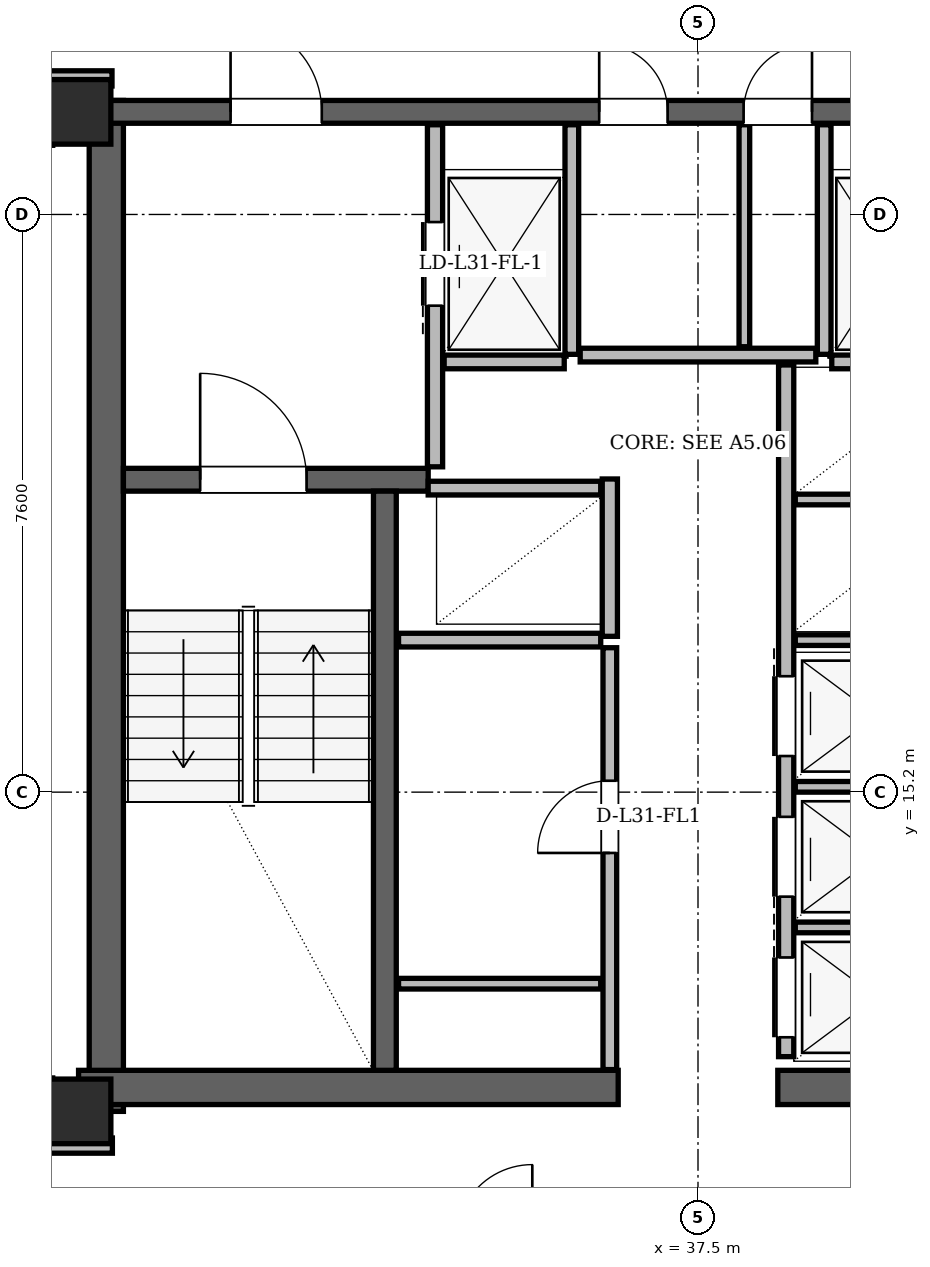
"""IFC4 building model, lengths in metres.
Left out: names, types, materials, properties, quantities, classifications, styles, units other than length and angle.
Written with IfcOpenShell. Run it as: python <this file> out.ifc"""

import sys

from ifc_helpers import new_model, si_unit, direction, frame, frame_2d, origin, origin_2d, place, context, subcontext, project, spatial, rectangle, hollow_rectangle, extrude, element, fill, save


model = new_model("IFC4")
c1 = context("Model", 3, precision=1e-05, world=origin(), true_north=direction((0.0, 1.0)))
c2 = subcontext(c1, "Body", "Model", "MODEL_VIEW")
j1 = project(units=[si_unit("LENGTHUNIT", "METRE"), si_unit("PLANEANGLEUNIT", "RADIAN")], contexts=[c1])
p1 = place(None, origin())
s1 = spatial("IfcSite", under=j1, at=p1, CompositionType="ELEMENT")
p2 = place(p1, origin())
s2 = spatial("IfcBuilding", under=s1, at=p2, CompositionType="ELEMENT")
p3 = place(p2, frame((0.0, 0.0, 119.4)))
s3 = spatial("IfcBuildingStorey", under=s2, at=p3, CompositionType="ELEMENT", Elevation=119.4)
for number, where, z_axis, x_axis in (
    (1, (29.35, 11.0, 0.0), (0.0, 0.0, 1.0), (1.0, 0.0, 0.0)),
    (2, (29.35, 24.15, 0.0), (0.0, 0.0, 1.0), (1.0, 0.0, 0.0)),
):
    element("IfcColumn", number, at=place(p3, frame(where, z_axis=z_axis, x_axis=x_axis)), inside=s3, PredefinedType="COLUMN", context=c2, shape_type="SweptSolid", body=[
        extrude(hollow_rectangle(XDim=0.85, YDim=0.85, WallThickness=0.07, at=origin_2d()), origin(), (0.0, 0.0, 1.0), 3.6),
    ])
p4 = place(p3, frame((29.715, 11.0, 0.0), z_axis=(0.0, 0.0, 1.0), x_axis=(0.0, 1.0, 0.0)))
e3 = element("IfcWall", 3, at=p4, inside=s3, PredefinedType="SHEAR", context=c2, shape_type="SweptSolid", body=[
    extrude(rectangle(XDim=13.3, YDim=0.45, at=frame_2d((6.65, 0.0))), origin(), (0.0, 0.0, 1.0), 3.36),
])
for number, where, z_axis, x_axis in (
    (4, (29.35, 11.315, 0.0), (0.0, 0.0, 1.0), (1.0, 0.0, 0.0)),
    (5, (38.55, 11.315, 0.0), (0.0, 0.0, 1.0), (1.0, 0.0, 0.0)),
):
    element("IfcWall", number, at=place(p3, frame(where, z_axis=z_axis, x_axis=x_axis)), inside=s3, PredefinedType="SHEAR", context=c2, shape_type="SweptSolid", body=[
        extrude(rectangle(XDim=7.1, YDim=0.45, at=frame_2d((3.55, 0.0))), origin(), (0.0, 0.0, 1.0), 3.36),
    ])
p5 = place(p3, frame((29.65, 24.15, 0.0), z_axis=(0.0, 0.0, 1.0), x_axis=(1.0, 0.0, 0.0)))
e6 = element("IfcWall", 6, at=p5, inside=s3, PredefinedType="SHEAR", context=c2, shape_type="SweptSolid", body=[
    extrude(rectangle(XDim=15.7, YDim=0.3, at=frame_2d((7.85, 0.0))), origin(), (0.0, 0.0, 1.0), 3.36),
])
p6 = place(p5, frame((1.7, 0.0, 0.0)))
e7 = element("IfcOpeningElement", 7, at=p6, cuts=e6, PredefinedType="OPENING", context=c2, shape_type="SweptSolid", body=[
    extrude(rectangle(XDim=1.2, YDim=2.2, at=frame_2d((0.6, 1.1))), frame((0.0, 0.15, 0.0), z_axis=(0.0, -1.0, 0.0), x_axis=(1.0, 0.0, 0.0)), (0.0, 0.0, 1.0), 0.3),
])
p7 = place(p5, frame((12.8, 0.0, 0.0)))
e8 = element("IfcOpeningElement", 8, at=p7, cuts=e6, PredefinedType="OPENING", context=c2, shape_type="SweptSolid", body=[
    extrude(rectangle(XDim=1.2, YDim=2.2, at=frame_2d((0.6, 1.1))), frame((0.0, 0.15, 0.0), z_axis=(0.0, -1.0, 0.0), x_axis=(1.0, 0.0, 0.0)), (0.0, 0.0, 1.0), 0.3),
])
p8 = place(p5, frame((6.55, 0.0, 0.0)))
e9 = element("IfcOpeningElement", 9, at=p8, cuts=e6, PredefinedType="OPENING", context=c2, shape_type="SweptSolid", body=[
    extrude(rectangle(XDim=0.9, YDim=2.05, at=frame_2d((0.45, 1.025))), frame((0.0, 0.15, 0.0), z_axis=(0.0, -1.0, 0.0), x_axis=(1.0, 0.0, 0.0)), (0.0, 0.0, 1.0), 0.3),
])
p9 = place(p5, frame((8.45, 0.0, 0.0)))
e10 = element("IfcOpeningElement", 10, at=p9, cuts=e6, PredefinedType="OPENING", context=c2, shape_type="SweptSolid", body=[
    extrude(rectangle(XDim=0.9, YDim=2.05, at=frame_2d((0.45, 1.025))), frame((0.0, 0.15, 0.0), z_axis=(0.0, -1.0, 0.0), x_axis=(1.0, 0.0, 0.0)), (0.0, 0.0, 1.0), 0.3),
])
p10 = place(p3, frame((29.94, 19.31, 0.0), z_axis=(0.0, 0.0, 1.0), x_axis=(1.0, 0.0, 0.0)))
e11 = element("IfcWall", 11, at=p10, inside=s3, PredefinedType="SHEAR", context=c2, shape_type="SweptSolid", body=[
    extrude(rectangle(XDim=4.01, YDim=0.3, at=frame_2d((2.005, 0.0))), origin(), (0.0, 0.0, 1.0), 3.36),
])
p11 = place(p10, frame((1.01, 0.0, 0.0)))
e12 = element("IfcOpeningElement", 12, at=p11, cuts=e11, PredefinedType="OPENING", context=c2, shape_type="SweptSolid", body=[
    extrude(rectangle(XDim=1.4, YDim=2.2, at=frame_2d((0.7, 1.1))), frame((0.0, 0.15, 0.0), z_axis=(0.0, -1.0, 0.0), x_axis=(1.0, 0.0, 0.0)), (0.0, 0.0, 1.0), 0.3),
])
p12 = place(p3, frame((33.38, 11.54, 0.0), z_axis=(0.0, 0.0, 1.0), x_axis=(0.0, 1.0, 0.0)))
e13 = element("IfcWall", 13, at=p12, inside=s3, PredefinedType="SHEAR", context=c2, shape_type="SweptSolid", body=[
    extrude(rectangle(XDim=7.62, YDim=0.3, at=frame_2d((3.81, 0.0))), origin(), (0.0, 0.0, 1.0), 3.36),
])
p13 = place(p3, frame((32.034, 43.406, 0.0), z_axis=(0.0, 0.0, 1.0), x_axis=(-0.499998569178, -0.866026229868, 0.0)))
e14 = element("IfcWall", 14, at=p13, inside=s3, PredefinedType="SOLIDWALL", context=c2, shape_type="SweptSolid", body=[
    extrude(rectangle(XDim=34.901, YDim=0.34, at=frame_2d((17.451, 0.0))), origin(), (0.0, 0.0, 1.0), 2.578),
])
p14 = place(p13, frame((6.469, 0.0, 0.0)))
e15 = element("IfcOpeningElement", 15, at=p14, cuts=e14, PredefinedType="OPENING", context=c2, shape_type="SweptSolid", body=[
    extrude(rectangle(XDim=1.3, YDim=2.2, at=frame_2d((0.65, 1.1))), frame((0.0, 0.17, 0.0), z_axis=(0.0, -1.0, 0.0), x_axis=(1.0, 0.0, 0.0)), (0.0, 0.0, 1.0), 0.34),
])
p15 = place(p13, frame((25.997, 0.0, 0.0)))
e16 = element("IfcOpeningElement", 16, at=p15, cuts=e14, PredefinedType="OPENING", context=c2, shape_type="SweptSolid", body=[
    extrude(rectangle(XDim=1.5, YDim=2.2, at=frame_2d((0.75, 1.1))), frame((0.0, 0.17, 0.0), z_axis=(0.0, -1.0, 0.0), x_axis=(1.0, 0.0, 0.0)), (0.0, 0.0, 1.0), 0.34),
])
p16 = place(p13, frame((12.195, 0.0, 0.85)))
e17 = element("IfcOpeningElement", 17, at=p16, cuts=e14, PredefinedType="OPENING", context=c2, shape_type="SweptSolid", body=[
    extrude(rectangle(XDim=1.8, YDim=1.618, at=frame_2d((0.9, 0.809))), frame((0.0, 0.17, 0.0), z_axis=(0.0, -1.0, 0.0), x_axis=(1.0, 0.0, 0.0)), (0.0, 0.0, 1.0), 0.34),
])
p17 = place(p13, frame((18.557, 0.0, 0.85)))
e18 = element("IfcOpeningElement", 18, at=p17, cuts=e14, PredefinedType="OPENING", context=c2, shape_type="SweptSolid", body=[
    extrude(rectangle(XDim=1.2, YDim=1.48, at=frame_2d((0.6, 0.74))), frame((0.0, 0.17, 0.0), z_axis=(0.0, -1.0, 0.0), x_axis=(1.0, 0.0, 0.0)), (0.0, 0.0, 1.0), 0.34),
])
p18 = place(p13, frame((3.108, 0.0, 0.85)))
e19 = element("IfcOpeningElement", 19, at=p18, cuts=e14, PredefinedType="OPENING", context=c2, shape_type="SweptSolid", body=[
    extrude(rectangle(XDim=1.2, YDim=1.48, at=frame_2d((0.6, 0.74))), frame((0.0, 0.17, 0.0), z_axis=(0.0, -1.0, 0.0), x_axis=(1.0, 0.0, 0.0)), (0.0, 0.0, 1.0), 0.34),
])
p19 = place(p13, frame((30.626, 0.0, 0.85)))
e20 = element("IfcOpeningElement", 20, at=p19, cuts=e14, PredefinedType="OPENING", context=c2, shape_type="SweptSolid", body=[
    extrude(rectangle(XDim=1.2, YDim=1.48, at=frame_2d((0.6, 0.74))), frame((0.0, 0.17, 0.0), z_axis=(0.0, -1.0, 0.0), x_axis=(1.0, 0.0, 0.0)), (0.0, 0.0, 1.0), 0.34),
])
p20 = place(p3, frame((34.04, 19.48, 0.0), z_axis=(0.0, 0.0, 1.0), x_axis=(0.0, 1.0, 0.0)))
e21 = element("IfcWall", 21, at=p20, inside=s3, PredefinedType="PARTITIONING", context=c2, shape_type="SweptSolid", body=[
    extrude(rectangle(XDim=4.5, YDim=0.2, at=frame_2d((2.25, 0.0))), origin(), (0.0, 0.0, 1.0), 2.4),
])
p21 = place(p20, frame((2.12, 0.0, 0.0)))
e22 = element("IfcOpeningElement", 22, at=p21, cuts=e21, PredefinedType="OPENING", context=c2, shape_type="SweptSolid", body=[
    extrude(rectangle(XDim=1.1, YDim=2.2, at=frame_2d((0.55, 1.1))), frame((0.0, 0.1, 0.0), z_axis=(0.0, -1.0, 0.0), x_axis=(1.0, 0.0, 0.0)), (0.0, 0.0, 1.0), 0.2),
])
p22 = place(p3, frame((35.84, 20.96, 0.0), z_axis=(0.0, 0.0, 1.0), x_axis=(0.0, 1.0, 0.0)))
e23 = element("IfcWall", 23, at=p22, inside=s3, PredefinedType="PARTITIONING", context=c2, shape_type="SweptSolid", body=[
    extrude(rectangle(XDim=3.02, YDim=0.18, at=frame_2d((1.51, 0.0))), origin(), (0.0, 0.0, 1.0), 2.4),
])
p23 = place(p3, frame((34.16, 20.86, 0.0), z_axis=(0.0, 0.0, 1.0), x_axis=(1.0, 0.0, 0.0)))
e24 = element("IfcWall", 24, at=p23, inside=s3, PredefinedType="PARTITIONING", context=c2, shape_type="SweptSolid", body=[
    extrude(rectangle(XDim=1.58, YDim=0.18, at=frame_2d((0.79, 0.0))), origin(), (0.0, 0.0, 1.0), 3.36),
])
p24 = place(p3, frame((39.16, 20.96, 0.0), z_axis=(0.0, 0.0, 1.0), x_axis=(0.0, 1.0, 0.0)))
e25 = element("IfcWall", 25, at=p24, inside=s3, PredefinedType="PARTITIONING", context=c2, shape_type="SweptSolid", body=[
    extrude(rectangle(XDim=3.02, YDim=0.18, at=frame_2d((1.51, 0.0))), origin(), (0.0, 0.0, 1.0), 2.4),
])
p25 = place(p3, frame((39.26, 20.86, 0.0), z_axis=(0.0, 0.0, 1.0), x_axis=(1.0, 0.0, 0.0)))
e26 = element("IfcWall", 26, at=p25, inside=s3, PredefinedType="PARTITIONING", context=c2, shape_type="SweptSolid", body=[
    extrude(rectangle(XDim=1.58, YDim=0.18, at=frame_2d((0.79, 0.0))), origin(), (0.0, 0.0, 1.0), 3.36),
])
p26 = place(p3, frame((36.34, 17.25, 0.0), z_axis=(0.0, 0.0, 1.0), x_axis=(0.0, 1.0, 0.0)))
e27 = element("IfcWall", 27, at=p26, inside=s3, PredefinedType="PARTITIONING", context=c2, shape_type="SweptSolid", body=[
    extrude(rectangle(XDim=2.07, YDim=0.2, at=frame_2d((1.035, 0.0))), origin(), (0.0, 0.0, 1.0), 3.36),
])
p27 = place(p3, frame((33.95, 19.2, 0.0), z_axis=(0.0, 0.0, 1.0), x_axis=(1.0, 0.0, 0.0)))
e28 = element("IfcWall", 28, at=p27, inside=s3, PredefinedType="PARTITIONING", context=c2, shape_type="SweptSolid", body=[
    extrude(rectangle(XDim=2.27, YDim=0.18, at=frame_2d((1.135, 0.0))), origin(), (0.0, 0.0, 1.0), 3.36),
])
p28 = place(p3, frame((33.56, 17.2, 0.0), z_axis=(0.0, 0.0, 1.0), x_axis=(1.0, 0.0, 0.0)))
e29 = element("IfcWall", 29, at=p28, inside=s3, PredefinedType="PARTITIONING", context=c2, shape_type="SweptSolid", body=[
    extrude(rectangle(XDim=2.66, YDim=0.18, at=frame_2d((1.33, 0.0))), origin(), (0.0, 0.0, 1.0), 3.36),
])
p29 = place(p3, frame((36.34, 11.55, 0.0), z_axis=(0.0, 0.0, 1.0), x_axis=(0.0, 1.0, 0.0)))
e30 = element("IfcWall", 30, at=p29, inside=s3, PredefinedType="PARTITIONING", context=c2, shape_type="SweptSolid", body=[
    extrude(rectangle(XDim=5.55, YDim=0.18, at=frame_2d((2.775, 0.0))), origin(), (0.0, 0.0, 1.0), 3.36),
])
p30 = place(p29, frame((2.85, 0.0, 0.0)))
e31 = element("IfcOpeningElement", 31, at=p30, cuts=e30, PredefinedType="OPENING", context=c2, shape_type="SweptSolid", body=[
    extrude(rectangle(XDim=0.95, YDim=2.1, at=frame_2d((0.475, 1.05))), frame((0.0, 0.09, 0.0), z_axis=(0.0, -1.0, 0.0), x_axis=(1.0, 0.0, 0.0)), (0.0, 0.0, 1.0), 0.18),
])
p31 = place(p3, frame((33.56, 12.68, 0.0), z_axis=(0.0, 0.0, 1.0), x_axis=(1.0, 0.0, 0.0)))
e32 = element("IfcWall", 32, at=p31, inside=s3, PredefinedType="PARTITIONING", context=c2, shape_type="SweptSolid", body=[
    extrude(rectangle(XDim=2.66, YDim=0.14, at=frame_2d((1.33, 0.0))), origin(), (0.0, 0.0, 1.0), 3.36),
])
p32 = place(p3, frame((38.66, 11.72, 0.0), z_axis=(0.0, 0.0, 1.0), x_axis=(0.0, 1.0, 0.0)))
e33 = element("IfcWall", 33, at=p32, inside=s3, PredefinedType="PARTITIONING", context=c2, shape_type="SweptSolid", body=[
    extrude(rectangle(XDim=9.1, YDim=0.2, at=frame_2d((4.55, 0.0))), origin(), (0.0, 0.0, 1.0), 3.36),
])
p33 = place(p32, frame((0.255, 0.0, 0.0)))
e34 = element("IfcOpeningElement", 34, at=p33, cuts=e33, PredefinedType="OPENING", context=c2, shape_type="SweptSolid", body=[
    extrude(rectangle(XDim=1.05, YDim=2.15, at=frame_2d((0.525, 1.075))), frame((0.0, 0.1, 0.0), z_axis=(0.0, -1.0, 0.0), x_axis=(1.0, 0.0, 0.0)), (0.0, 0.0, 1.0), 0.2),
])
p34 = place(p32, frame((2.105, 0.0, 0.0)))
e35 = element("IfcOpeningElement", 35, at=p34, cuts=e33, PredefinedType="OPENING", context=c2, shape_type="SweptSolid", body=[
    extrude(rectangle(XDim=1.05, YDim=2.15, at=frame_2d((0.525, 1.075))), frame((0.0, 0.1, 0.0), z_axis=(0.0, -1.0, 0.0), x_axis=(1.0, 0.0, 0.0)), (0.0, 0.0, 1.0), 0.2),
])
p35 = place(p32, frame((3.955, 0.0, 0.0)))
e36 = element("IfcOpeningElement", 36, at=p35, cuts=e33, PredefinedType="OPENING", context=c2, shape_type="SweptSolid", body=[
    extrude(rectangle(XDim=1.05, YDim=2.15, at=frame_2d((0.525, 1.075))), frame((0.0, 0.1, 0.0), z_axis=(0.0, -1.0, 0.0), x_axis=(1.0, 0.0, 0.0)), (0.0, 0.0, 1.0), 0.2),
])
for number, where, z_axis, x_axis in (
    (37, (38.78, 13.42, 0.0), (0.0, 0.0, 1.0), (1.0, 0.0, 0.0)),
    (38, (38.78, 15.27, 0.0), (0.0, 0.0, 1.0), (1.0, 0.0, 0.0)),
    (39, (38.78, 17.2, 0.0), (0.0, 0.0, 1.0), (1.0, 0.0, 0.0)),
    (40, (38.78, 19.05, 0.0), (0.0, 0.0, 1.0), (1.0, 0.0, 0.0)),
):
    element("IfcWall", number, at=place(p3, frame(where, z_axis=z_axis, x_axis=x_axis)), inside=s3, PredefinedType="PARTITIONING", context=c2, shape_type="SweptSolid", body=[
        extrude(rectangle(XDim=2.66, YDim=0.14, at=frame_2d((1.33, 0.0))), origin(), (0.0, 0.0, 1.0), 3.36),
    ])
p36 = place(p3, frame((35.95, 20.95, 0.0), z_axis=(0.0, 0.0, 1.0), x_axis=(1.0, 0.0, 0.0)))
e41 = element("IfcWall", 41, at=p36, inside=s3, PredefinedType="PARTITIONING", context=c2, shape_type="SweptSolid", body=[
    extrude(rectangle(XDim=3.1, YDim=0.18, at=frame_2d((1.55, 0.0))), origin(), (0.0, 0.0, 1.0), 3.36),
])
p37 = place(p3, frame((38.11, 21.06, 0.0), z_axis=(0.0, 0.0, 1.0), x_axis=(0.0, 1.0, 0.0)))
e42 = element("IfcWall", 42, at=p37, inside=s3, PredefinedType="PARTITIONING", context=c2, shape_type="SweptSolid", body=[
    extrude(rectangle(XDim=2.92, YDim=0.14, at=frame_2d((1.46, 0.0))), origin(), (0.0, 0.0, 1.0), 2.4),
])
p38 = place(p3, frame((28.905, 10.55, 0.0), z_axis=(0.0, 0.0, 1.0), x_axis=(1.0, 0.0, 0.0)))
e43 = element("IfcWall", 43, at=p38, inside=s3, PredefinedType="PARTITIONING", context=c2, shape_type="SweptSolid", body=[
    extrude(rectangle(XDim=0.89, YDim=0.2, at=frame_2d((0.445, 0.0))), origin(), (0.0, 0.0, 1.0), 3.36),
])
p39 = place(p3, frame((28.91, 24.59, 0.0), z_axis=(0.0, 0.0, 1.0), x_axis=(1.0, 0.0, 0.0)))
e44 = element("IfcWall", 44, at=p39, inside=s3, PredefinedType="PARTITIONING", context=c2, shape_type="SweptSolid", body=[
    extrude(rectangle(XDim=0.88, YDim=0.2, at=frame_2d((0.44, 0.0))), origin(), (0.0, 0.0, 1.0), 2.814),
])
p40 = place(p3, frame((28.91, 10.654, 0.0), z_axis=(0.0, 0.0, 1.0), x_axis=(0.0, 1.0, 0.0)))
e45 = element("IfcWall", 45, at=p40, inside=s3, PredefinedType="PARTITIONING", context=c2, shape_type="SweptSolid", body=[
    extrude(rectangle(XDim=0.786, YDim=0.2, at=frame_2d((0.393, 0.0))), origin(), (0.0, 0.0, 1.0), 2.814),
])
p41 = place(p3, frame((28.91, 23.71, 0.0), z_axis=(0.0, 0.0, 1.0), x_axis=(0.0, 1.0, 0.0)))
e46 = element("IfcWall", 46, at=p41, inside=s3, PredefinedType="PARTITIONING", context=c2, shape_type="SweptSolid", body=[
    extrude(rectangle(XDim=0.61, YDim=0.2, at=frame_2d((0.305, 0.0))), origin(), (0.0, 0.0, 1.0), 3.36),
])
p42 = place(p30, origin())
e47 = element("IfcDoor", 47, at=p42, inside=s3, OperationType="SINGLE_SWING_LEFT", PredefinedType="DOOR", context=c2, shape_type="SweptSolid", body=[
    extrude(rectangle(XDim=0.95, YDim=2.1, at=frame_2d((0.475, 1.05))), frame((0.0, 0.025, 0.0), z_axis=(0.0, -1.0, 0.0), x_axis=(1.0, 0.0, 0.0)), (0.0, 0.0, 1.0), 0.05),
])
fill(e31, e47)
p43 = place(p21, origin())
e48 = element("IfcDoor", 48, at=p43, inside=s3, OperationType="SLIDING_TO_LEFT", PredefinedType="DOOR", context=c2, shape_type="SweptSolid", body=[
    extrude(rectangle(XDim=1.1, YDim=2.2, at=frame_2d((0.55, 1.1))), frame((0.0, 0.025, 0.0), z_axis=(0.0, -1.0, 0.0), x_axis=(1.0, 0.0, 0.0)), (0.0, 0.0, 1.0), 0.05),
])
fill(e22, e48)
p44 = place(p33, origin())
e49 = element("IfcDoor", 49, at=p44, inside=s3, OperationType="SLIDING_TO_RIGHT", PredefinedType="DOOR", context=c2, shape_type="SweptSolid", body=[
    extrude(rectangle(XDim=1.05, YDim=2.15, at=frame_2d((0.525, 1.075))), frame((0.0, 0.025, 0.0), z_axis=(0.0, -1.0, 0.0), x_axis=(1.0, 0.0, 0.0)), (0.0, 0.0, 1.0), 0.05),
])
fill(e34, e49)
p45 = place(p34, origin())
e50 = element("IfcDoor", 50, at=p45, inside=s3, OperationType="SLIDING_TO_LEFT", PredefinedType="DOOR", context=c2, shape_type="SweptSolid", body=[
    extrude(rectangle(XDim=1.05, YDim=2.15, at=frame_2d((0.525, 1.075))), frame((0.0, 0.025, 0.0), z_axis=(0.0, -1.0, 0.0), x_axis=(1.0, 0.0, 0.0)), (0.0, 0.0, 1.0), 0.05),
])
fill(e35, e50)
p46 = place(p35, origin())
e51 = element("IfcDoor", 51, at=p46, inside=s3, OperationType="SLIDING_TO_RIGHT", PredefinedType="DOOR", context=c2, shape_type="SweptSolid", body=[
    extrude(rectangle(XDim=1.05, YDim=2.15, at=frame_2d((0.525, 1.075))), frame((0.0, 0.025, 0.0), z_axis=(0.0, -1.0, 0.0), x_axis=(1.0, 0.0, 0.0)), (0.0, 0.0, 1.0), 0.05),
])
fill(e36, e51)
p47 = place(p11, origin())
e52 = element("IfcDoor", 52, at=p47, inside=s3, OperationType="SINGLE_SWING_LEFT", PredefinedType="DOOR", context=c2, shape_type="SweptSolid", body=[
    extrude(rectangle(XDim=1.4, YDim=2.2, at=frame_2d((0.7, 1.1))), frame((0.0, 0.025, 0.0), z_axis=(0.0, -1.0, 0.0), x_axis=(1.0, 0.0, 0.0)), (0.0, 0.0, 1.0), 0.05),
])
fill(e12, e52)
p48 = place(p6, origin())
e53 = element("IfcDoor", 53, at=p48, inside=s3, OperationType="SINGLE_SWING_LEFT", PredefinedType="DOOR", context=c2, shape_type="SweptSolid", body=[
    extrude(rectangle(XDim=1.2, YDim=2.2, at=frame_2d((0.6, 1.1))), frame((0.0, 0.025, 0.0), z_axis=(0.0, -1.0, 0.0), x_axis=(1.0, 0.0, 0.0)), (0.0, 0.0, 1.0), 0.05),
])
fill(e7, e53)
p49 = place(p8, origin())
e54 = element("IfcDoor", 54, at=p49, inside=s3, OperationType="SINGLE_SWING_LEFT", PredefinedType="DOOR", context=c2, shape_type="SweptSolid", body=[
    extrude(rectangle(XDim=0.9, YDim=2.05, at=frame_2d((0.45, 1.025))), frame((0.0, 0.025, 0.0), z_axis=(0.0, -1.0, 0.0), x_axis=(1.0, 0.0, 0.0)), (0.0, 0.0, 1.0), 0.05),
])
fill(e9, e54)
p50 = place(p9, origin())
e55 = element("IfcDoor", 55, at=p50, inside=s3, OperationType="SINGLE_SWING_RIGHT", PredefinedType="DOOR", context=c2, shape_type="SweptSolid", body=[
    extrude(rectangle(XDim=0.9, YDim=2.05, at=frame_2d((0.45, 1.025))), frame((0.0, 0.025, 0.0), z_axis=(0.0, -1.0, 0.0), x_axis=(1.0, 0.0, 0.0)), (0.0, 0.0, 1.0), 0.05),
])
fill(e10, e55)
save(model, sys.argv[1])
